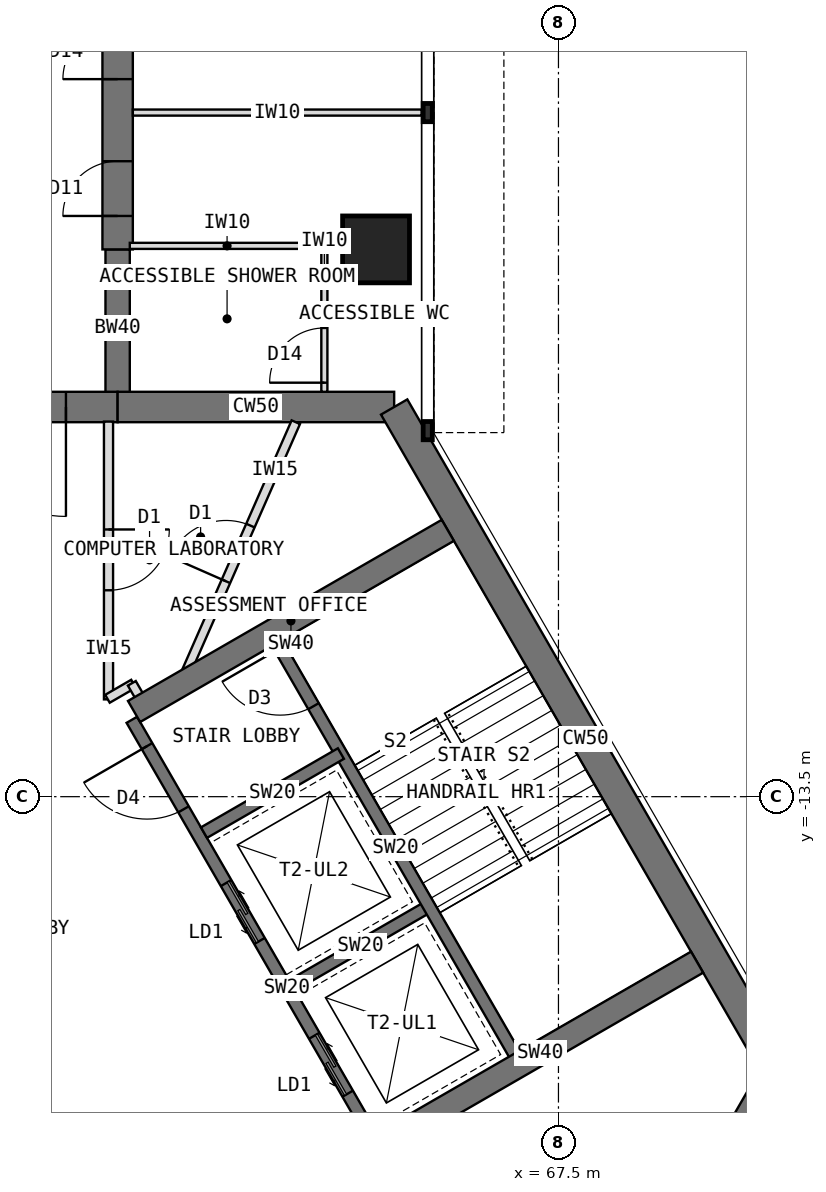
"""IFC4 building model, lengths in metres.
Left out: names, types, materials, properties, quantities, classifications, styles, units other than length and angle.
Written with IfcOpenShell. Run it as: python <this file> out.ifc"""

import sys

from ifc_helpers import new_model, si_unit, direction, frame, frame_2d, origin, origin_2d, place, context, subcontext, project, spatial, rectangle, extrude, element, fill, save


model = new_model("IFC4")
c1 = context("Model", 3, precision=1e-05, world=origin(), true_north=direction((0.0, 1.0)))
c2 = subcontext(c1, "Body", "Model", "MODEL_VIEW")
j1 = project(units=[si_unit("LENGTHUNIT", "METRE"), si_unit("PLANEANGLEUNIT", "RADIAN")], contexts=[c1])
p1 = place(None, origin())
s1 = spatial("IfcSite", under=j1, at=p1, CompositionType="ELEMENT")
p2 = place(p1, origin())
s2 = spatial("IfcBuilding", under=s1, at=p2, CompositionType="ELEMENT")
p3 = place(p2, frame((0.0, 0.0, 218.5)))
s3 = spatial("IfcBuildingStorey", under=s2, at=p3, CompositionType="ELEMENT", Elevation=218.5)
p4 = place(p3, frame((64.798, -7.092, 0.0), z_axis=(0.0, 0.0, 1.0), x_axis=(-1.0, 0.0, 0.0)))
e1 = element("IfcWall", 1, at=p4, inside=s3, PredefinedType="SHEAR", context=c2, shape_type="SweptSolid", body=[
    extrude(rectangle(XDim=4.548, YDim=0.5, at=frame_2d((2.274, 0.0))), origin(), (0.0, 0.0, 1.0), 4.0),
])
p5 = place(p3, frame((60.25, -7.092, 0.0), z_axis=(0.0, 0.0, 1.0), x_axis=(-1.0, 0.0, 0.0)))
e2 = element("IfcWall", 2, at=p5, inside=s3, PredefinedType="SHEAR", context=c2, shape_type="SweptSolid", body=[
    extrude(rectangle(XDim=3.5, YDim=0.5, at=frame_2d((1.75, 0.0))), origin(), (0.0, 0.0, 1.0), 4.0),
])
p6 = place(p5, frame((0.85, 0.0, 0.0)))
e3 = element("IfcOpeningElement", 3, at=p6, cuts=e2, PredefinedType="OPENING", context=c2, shape_type="SweptSolid", body=[
    extrude(rectangle(XDim=1.8, YDim=2.1, at=frame_2d((0.9, 1.05))), frame((0.0, 0.26, 0.0), z_axis=(0.0, -1.0, 0.0), x_axis=(1.0, 0.0, 0.0)), (0.0, 0.0, 1.0), 0.52),
])
p7 = place(p3, frame((68.822, -21.939, 0.0), z_axis=(0.0, 0.0, 1.0), x_axis=(0.500024481964, 0.866011268655, 0.0)))
e4 = element("IfcWall", 4, at=p7, inside=s3, PredefinedType="SHEAR", context=c2, shape_type="SweptSolid", body=[
    extrude(rectangle(XDim=4.548, YDim=0.5, at=frame_2d((2.274, 0.0))), origin(), (0.0, 0.0, 1.0), 4.0),
])
p8 = place(p3, frame((71.096, -18.0, 0.0), z_axis=(0.0, 0.0, 1.0), x_axis=(-0.500005998175, 0.866021940709, 0.0)))
e5 = element("IfcWall", 5, at=p8, inside=s3, PredefinedType="SHEAR", context=c2, shape_type="SweptSolid", body=[
    extrude(rectangle(XDim=12.596, YDim=0.5, at=frame_2d((6.298, 0.0))), origin(), (0.0, 0.0, 1.0), 4.0),
])
p9 = place(p3, frame((60.25, -7.092, 0.0), z_axis=(0.0, 0.0, 1.0), x_axis=(0.0, 1.0, 0.0)))
e6 = element("IfcWall", 6, at=p9, inside=s3, PredefinedType="SHEAR", context=c2, shape_type="SweptSolid", body=[
    extrude(rectangle(XDim=2.592, YDim=0.4, at=frame_2d((1.296, 0.0))), origin(), (0.0, 0.0, 1.0), 4.0),
])
p10 = place(p3, frame((60.25, -4.5, 0.0), z_axis=(0.0, 0.0, 1.0), x_axis=(0.0, 1.0, 0.0)))
e7 = element("IfcWall", 7, at=p10, inside=s3, PredefinedType="SHEAR", context=c2, shape_type="SweptSolid", body=[
    extrude(rectangle(XDim=13.2, YDim=0.5, at=frame_2d((6.6, 0.0))), origin(), (0.0, 0.0, 1.0), 4.0),
])
p11 = place(p10, frame((0.55, 0.0, 0.0)))
e8 = element("IfcOpeningElement", 8, at=p11, cuts=e7, PredefinedType="OPENING", context=c2, shape_type="SweptSolid", body=[
    extrude(rectangle(XDim=0.9, YDim=2.1, at=frame_2d((0.45, 1.05))), frame((0.0, 0.26, 0.0), z_axis=(0.0, -1.0, 0.0), x_axis=(1.0, 0.0, 0.0)), (0.0, 0.0, 1.0), 0.52),
])
p12 = place(p10, frame((2.8, 0.0, 0.0)))
e9 = element("IfcOpeningElement", 9, at=p12, cuts=e7, PredefinedType="OPENING", context=c2, shape_type="SweptSolid", body=[
    extrude(rectangle(XDim=0.9, YDim=2.1, at=frame_2d((0.45, 1.05))), frame((0.0, 0.26, 0.0), z_axis=(0.0, -1.0, 0.0), x_axis=(1.0, 0.0, 0.0)), (0.0, 0.0, 1.0), 0.52),
])
p13 = place(p10, frame((7.3, 0.0, 0.0)))
e10 = element("IfcOpeningElement", 10, at=p13, cuts=e7, PredefinedType="OPENING", context=c2, shape_type="SweptSolid", body=[
    extrude(rectangle(XDim=0.9, YDim=2.1, at=frame_2d((0.45, 1.05))), frame((0.0, 0.26, 0.0), z_axis=(0.0, -1.0, 0.0), x_axis=(1.0, 0.0, 0.0)), (0.0, 0.0, 1.0), 0.52),
])
p14 = place(p3, frame((64.5, -4.5, 0.0), z_axis=(0.0, 0.0, 1.0), x_axis=(1.0, 0.0, 0.0)))
e11 = element("IfcColumn", 11, at=p14, inside=s3, PredefinedType="COLUMN", context=c2, shape_type="SweptSolid", body=[
    extrude(rectangle(XDim=1.1, YDim=1.1, at=origin_2d()), origin(), (0.0, 0.0, 1.0), 4.0),
])
p15 = place(p3, frame((64.484, -19.164, 0.0), z_axis=(0.0, 0.0, 1.0), x_axis=(-0.49999894854, 0.866026010844, 0.0)))
e12 = element("IfcWall", 12, at=p15, inside=s3, PredefinedType="SHEAR", context=c2, shape_type="SweptSolid", body=[
    extrude(rectangle(XDim=8.0, YDim=0.2, at=frame_2d((4.0, 0.0))), origin(), (0.0, 0.0, 1.0), 4.0),
])
p16 = place(p15, frame((6.3, 0.0, 0.0)))
e13 = element("IfcOpeningElement", 13, at=p16, cuts=e12, PredefinedType="OPENING", context=c2, shape_type="SweptSolid", body=[
    extrude(rectangle(XDim=1.2, YDim=2.1, at=frame_2d((0.6, 1.05))), frame((0.0, 0.11, 0.0), z_axis=(0.0, -1.0, 0.0), x_axis=(1.0, 0.0, 0.0)), (0.0, 0.0, 1.0), 0.22),
])
p17 = place(p15, frame((0.9, 0.0, 0.0)))
e14 = element("IfcOpeningElement", 14, at=p17, cuts=e12, PredefinedType="OPENING", context=c2, shape_type="SweptSolid", body=[
    extrude(rectangle(XDim=1.1, YDim=2.2, at=frame_2d((0.55, 1.1))), frame((0.0, 0.11, 0.0), z_axis=(0.0, -1.0, 0.0), x_axis=(1.0, 0.0, 0.0)), (0.0, 0.0, 1.0), 0.22),
])
p18 = place(p15, frame((3.8, 0.0, 0.0)))
e15 = element("IfcOpeningElement", 15, at=p18, cuts=e12, PredefinedType="OPENING", context=c2, shape_type="SweptSolid", body=[
    extrude(rectangle(XDim=1.1, YDim=2.2, at=frame_2d((0.55, 1.1))), frame((0.0, 0.11, 0.0), z_axis=(0.0, -1.0, 0.0), x_axis=(1.0, 0.0, 0.0)), (0.0, 0.0, 1.0), 0.22),
])
p19 = place(p3, frame((63.12, -16.603, 0.0), z_axis=(0.0, 0.0, 1.0), x_axis=(0.866062058628, 0.499936506574, 0.0)))
e16 = element("IfcWall", 16, at=p19, inside=s3, PredefinedType="SHEAR", context=c2, shape_type="SweptSolid", body=[
    extrude(rectangle(XDim=2.6, YDim=0.2, at=frame_2d((1.3, 0.0))), origin(), (0.0, 0.0, 1.0), 4.0),
])
p20 = place(p3, frame((61.67, -14.091, 0.0), z_axis=(0.0, 0.0, 1.0), x_axis=(0.86603858612, 0.49997716683, 0.0)))
e17 = element("IfcWall", 17, at=p20, inside=s3, PredefinedType="SHEAR", context=c2, shape_type="SweptSolid", body=[
    extrude(rectangle(XDim=2.6, YDim=0.2, at=frame_2d((1.3, 0.0))), origin(), (0.0, 0.0, 1.0), 4.0),
])
p21 = place(p3, frame((66.822, -17.814, 0.0), z_axis=(0.0, 0.0, 1.0), x_axis=(-0.49999894854, 0.866026010844, 0.0)))
e18 = element("IfcWall", 18, at=p21, inside=s3, PredefinedType="SHEAR", context=c2, shape_type="SweptSolid", body=[
    extrude(rectangle(XDim=8.0, YDim=0.2, at=frame_2d((4.0, 0.0))), origin(), (0.0, 0.0, 1.0), 4.0),
])
p22 = place(p21, frame((6.7, 0.0, 0.0)))
e19 = element("IfcOpeningElement", 19, at=p22, cuts=e18, PredefinedType="OPENING", context=c2, shape_type="SweptSolid", body=[
    extrude(rectangle(XDim=1.1, YDim=2.1, at=frame_2d((0.55, 1.05))), frame((0.0, 0.11, 0.0), z_axis=(0.0, -1.0, 0.0), x_axis=(1.0, 0.0, 0.0)), (0.0, 0.0, 1.0), 0.22),
])
p23 = place(p3, frame((60.52, -12.099, 0.0), z_axis=(0.0, 0.0, 1.0), x_axis=(0.86602319114, 0.500003832394, 0.0)))
e20 = element("IfcWall", 20, at=p23, inside=s3, PredefinedType="SHEAR", context=c2, shape_type="SweptSolid", body=[
    extrude(rectangle(XDim=5.958, YDim=0.4, at=frame_2d((2.979, 0.0))), origin(), (0.0, 0.0, 1.0), 4.0),
])
p24 = place(p3, frame((64.62, -19.201, 0.0), z_axis=(0.0, 0.0, 1.0), x_axis=(0.866012946976, 0.500021575205, 0.0)))
e21 = element("IfcWall", 21, at=p24, inside=s3, PredefinedType="SHEAR", context=c2, shape_type="SweptSolid", body=[
    extrude(rectangle(XDim=5.958, YDim=0.4, at=frame_2d((2.979, 0.0))), origin(), (0.0, 0.0, 1.0), 4.0),
])
p25 = place(p3, frame((60.5, -2.25, 0.0), z_axis=(0.0, 0.0, 1.0), x_axis=(1.0, 0.0, 0.0)))
e22 = element("IfcWall", 22, at=p25, inside=s3, PredefinedType="PARTITIONING", context=c2, shape_type="SweptSolid", body=[
    extrude(rectangle(XDim=4.75, YDim=0.1, at=frame_2d((2.375, 0.0))), origin(), (0.0, 0.0, 1.0), 3.8),
])
p26 = place(p3, frame((63.65, -6.842, 0.0), z_axis=(0.0, 0.0, 1.0), x_axis=(0.0, 1.0, 0.0)))
e23 = element("IfcWall", 23, at=p26, inside=s3, PredefinedType="PARTITIONING", context=c2, shape_type="SweptSolid", body=[
    extrude(rectangle(XDim=2.4, YDim=0.1, at=frame_2d((1.2, 0.0))), origin(), (0.0, 0.0, 1.0), 3.8),
])
p27 = place(p26, frame((0.15, 0.0, 0.0)))
e24 = element("IfcOpeningElement", 24, at=p27, cuts=e23, PredefinedType="OPENING", context=c2, shape_type="SweptSolid", body=[
    extrude(rectangle(XDim=0.9, YDim=2.1, at=frame_2d((0.45, 1.05))), frame((0.0, 0.06, 0.0), z_axis=(0.0, -1.0, 0.0), x_axis=(1.0, 0.0, 0.0)), (0.0, 0.0, 1.0), 0.12),
])
p28 = place(p3, frame((60.45, -4.442, 0.0), z_axis=(0.0, 0.0, 1.0), x_axis=(1.0, 0.0, 0.0)))
e25 = element("IfcWall", 25, at=p28, inside=s3, PredefinedType="PARTITIONING", context=c2, shape_type="SweptSolid", body=[
    extrude(rectangle(XDim=3.2, YDim=0.1, at=frame_2d((1.6, 0.0))), origin(), (0.0, 0.0, 1.0), 3.267),
])
p29 = place(p3, frame((60.1, -7.332, 0.0), z_axis=(0.0, 0.0, 1.0), x_axis=(0.0, -1.0, 0.0)))
e26 = element("IfcWall", 26, at=p29, inside=s3, PredefinedType="PARTITIONING", context=c2, shape_type="SweptSolid", body=[
    extrude(rectangle(XDim=4.568, YDim=0.15, at=frame_2d((2.284, 0.0))), origin(), (0.0, 0.0, 1.0), 3.8),
])
p30 = place(p29, frame((1.774, 0.0, 0.0)))
e27 = element("IfcOpeningElement", 27, at=p30, cuts=e26, PredefinedType="OPENING", context=c2, shape_type="SweptSolid", body=[
    extrude(rectangle(XDim=1.0, YDim=2.1, at=frame_2d((0.5, 1.05))), frame((0.0, 0.085, 0.0), z_axis=(0.0, -1.0, 0.0), x_axis=(1.0, 0.0, 0.0)), (0.0, 0.0, 1.0), 0.17),
])
p31 = place(p3, frame((60.083, -11.89, 0.0), z_axis=(0.0, 0.0, 1.0), x_axis=(0.865831790172, 0.50033519877, 0.0)))
e28 = element("IfcWall", 28, at=p31, inside=s3, PredefinedType="PARTITIONING", context=c2, shape_type="SweptSolid", body=[
    extrude(rectangle(XDim=0.494, YDim=0.15, at=frame_2d((0.247, 0.0))), origin(), (0.0, 0.0, 1.0), 3.8),
])
p32 = place(p3, frame((60.483, -11.635, 0.0), z_axis=(0.0, 0.0, 1.0), x_axis=(0.500230298122, -0.865892400268, 0.0)))
e29 = element("IfcWall", 29, at=p32, inside=s3, PredefinedType="PARTITIONING", context=c2, shape_type="SweptSolid", body=[
    extrude(rectangle(XDim=0.43, YDim=0.15, at=frame_2d((0.215, 0.0))), origin(), (0.0, 0.0, 1.0), 3.8),
])
p33 = place(p3, frame((61.285, -11.658, 0.0), z_axis=(0.0, 0.0, 1.0), x_axis=(0.402073730919, 0.915607292951, 0.0)))
e30 = element("IfcWall", 30, at=p33, inside=s3, PredefinedType="PARTITIONING", context=c2, shape_type="SweptSolid", body=[
    extrude(rectangle(XDim=4.714, YDim=0.15, at=frame_2d((2.357, 0.0))), origin(), (0.0, 0.0, 1.0), 3.8),
])
p34 = place(p33, frame((1.857, 0.0, 0.0)))
e31 = element("IfcOpeningElement", 31, at=p34, cuts=e30, PredefinedType="OPENING", context=c2, shape_type="SweptSolid", body=[
    extrude(rectangle(XDim=1.0, YDim=2.1, at=frame_2d((0.5, 1.05))), frame((0.0, 0.085, 0.0), z_axis=(0.0, -1.0, 0.0), x_axis=(1.0, 0.0, 0.0)), (0.0, 0.0, 1.0), 0.17),
])
p35 = place(p16, origin())
e32 = element("IfcDoor", 32, at=p35, inside=s3, OperationType="SINGLE_SWING_RIGHT", PredefinedType="DOOR", context=c2, shape_type="SweptSolid", body=[
    extrude(rectangle(XDim=1.2, YDim=2.1, at=frame_2d((0.6, 1.05))), frame((0.0, 0.025, 0.0), z_axis=(0.0, -1.0, 0.0), x_axis=(1.0, 0.0, 0.0)), (0.0, 0.0, 1.0), 0.05),
])
fill(e13, e32)
p36 = place(p17, origin())
e33 = element("IfcDoor", 33, at=p36, inside=s3, OperationType="DOUBLE_DOOR_SLIDING", PredefinedType="DOOR", context=c2, shape_type="SweptSolid", body=[
    extrude(rectangle(XDim=1.1, YDim=2.2, at=frame_2d((0.55, 1.1))), frame((0.0, 0.025, 0.0), z_axis=(0.0, -1.0, 0.0), x_axis=(1.0, 0.0, 0.0)), (0.0, 0.0, 1.0), 0.05),
])
fill(e14, e33)
p37 = place(p18, origin())
e34 = element("IfcDoor", 34, at=p37, inside=s3, OperationType="DOUBLE_DOOR_SLIDING", PredefinedType="DOOR", context=c2, shape_type="SweptSolid", body=[
    extrude(rectangle(XDim=1.1, YDim=2.2, at=frame_2d((0.55, 1.1))), frame((0.0, 0.025, 0.0), z_axis=(0.0, -1.0, 0.0), x_axis=(1.0, 0.0, 0.0)), (0.0, 0.0, 1.0), 0.05),
])
fill(e15, e34)
p38 = place(p22, origin())
e35 = element("IfcDoor", 35, at=p38, inside=s3, OperationType="SINGLE_SWING_RIGHT", PredefinedType="DOOR", context=c2, shape_type="SweptSolid", body=[
    extrude(rectangle(XDim=1.1, YDim=2.1, at=frame_2d((0.55, 1.05))), frame((0.0, 0.025, 0.0), z_axis=(0.0, -1.0, 0.0), x_axis=(1.0, 0.0, 0.0)), (0.0, 0.0, 1.0), 0.05),
])
fill(e19, e35)
p39 = place(p6, origin())
e36 = element("IfcDoor", 36, at=p39, inside=s3, OperationType="DOUBLE_DOOR_DOUBLE_SWING", PredefinedType="DOOR", context=c2, shape_type="SweptSolid", body=[
    extrude(rectangle(XDim=1.8, YDim=2.1, at=frame_2d((0.9, 1.05))), frame((0.0, 0.025, 0.0), z_axis=(0.0, -1.0, 0.0), x_axis=(1.0, 0.0, 0.0)), (0.0, 0.0, 1.0), 0.05),
])
fill(e3, e36)
p40 = place(p27, origin())
e37 = element("IfcDoor", 37, at=p40, inside=s3, OperationType="SINGLE_SWING_LEFT", PredefinedType="DOOR", context=c2, shape_type="SweptSolid", body=[
    extrude(rectangle(XDim=0.9, YDim=2.1, at=frame_2d((0.45, 1.05))), frame((0.0, 0.025, 0.0), z_axis=(0.0, -1.0, 0.0), x_axis=(1.0, 0.0, 0.0)), (0.0, 0.0, 1.0), 0.05),
])
fill(e24, e37)
p41 = place(p30, origin())
e38 = element("IfcDoor", 38, at=p41, inside=s3, OperationType="SINGLE_SWING_LEFT", PredefinedType="DOOR", context=c2, shape_type="SweptSolid", body=[
    extrude(rectangle(XDim=1.0, YDim=2.1, at=frame_2d((0.5, 1.05))), frame((0.0, 0.025, 0.0), z_axis=(0.0, -1.0, 0.0), x_axis=(1.0, 0.0, 0.0)), (0.0, 0.0, 1.0), 0.05),
])
fill(e27, e38)
p42 = place(p34, origin())
e39 = element("IfcDoor", 39, at=p42, inside=s3, OperationType="SINGLE_SWING_LEFT", PredefinedType="DOOR", context=c2, shape_type="SweptSolid", body=[
    extrude(rectangle(XDim=1.0, YDim=2.1, at=frame_2d((0.5, 1.05))), frame((0.0, 0.025, 0.0), z_axis=(0.0, -1.0, 0.0), x_axis=(1.0, 0.0, 0.0)), (0.0, 0.0, 1.0), 0.05),
])
fill(e31, e39)
p43 = place(p11, origin())
e40 = element("IfcDoor", 40, at=p43, inside=s3, OperationType="SINGLE_SWING_LEFT", PredefinedType="DOOR", context=c2, shape_type="SweptSolid", body=[
    extrude(rectangle(XDim=0.9, YDim=2.1, at=frame_2d((0.45, 1.05))), frame((0.0, 0.025, 0.0), z_axis=(0.0, -1.0, 0.0), x_axis=(1.0, 0.0, 0.0)), (0.0, 0.0, 1.0), 0.05),
])
fill(e8, e40)
p44 = place(p12, origin())
e41 = element("IfcDoor", 41, at=p44, inside=s3, OperationType="SINGLE_SWING_LEFT", PredefinedType="DOOR", context=c2, shape_type="SweptSolid", body=[
    extrude(rectangle(XDim=0.9, YDim=2.1, at=frame_2d((0.45, 1.05))), frame((0.0, 0.025, 0.0), z_axis=(0.0, -1.0, 0.0), x_axis=(1.0, 0.0, 0.0)), (0.0, 0.0, 1.0), 0.05),
])
fill(e9, e41)
save(model, sys.argv[1])
